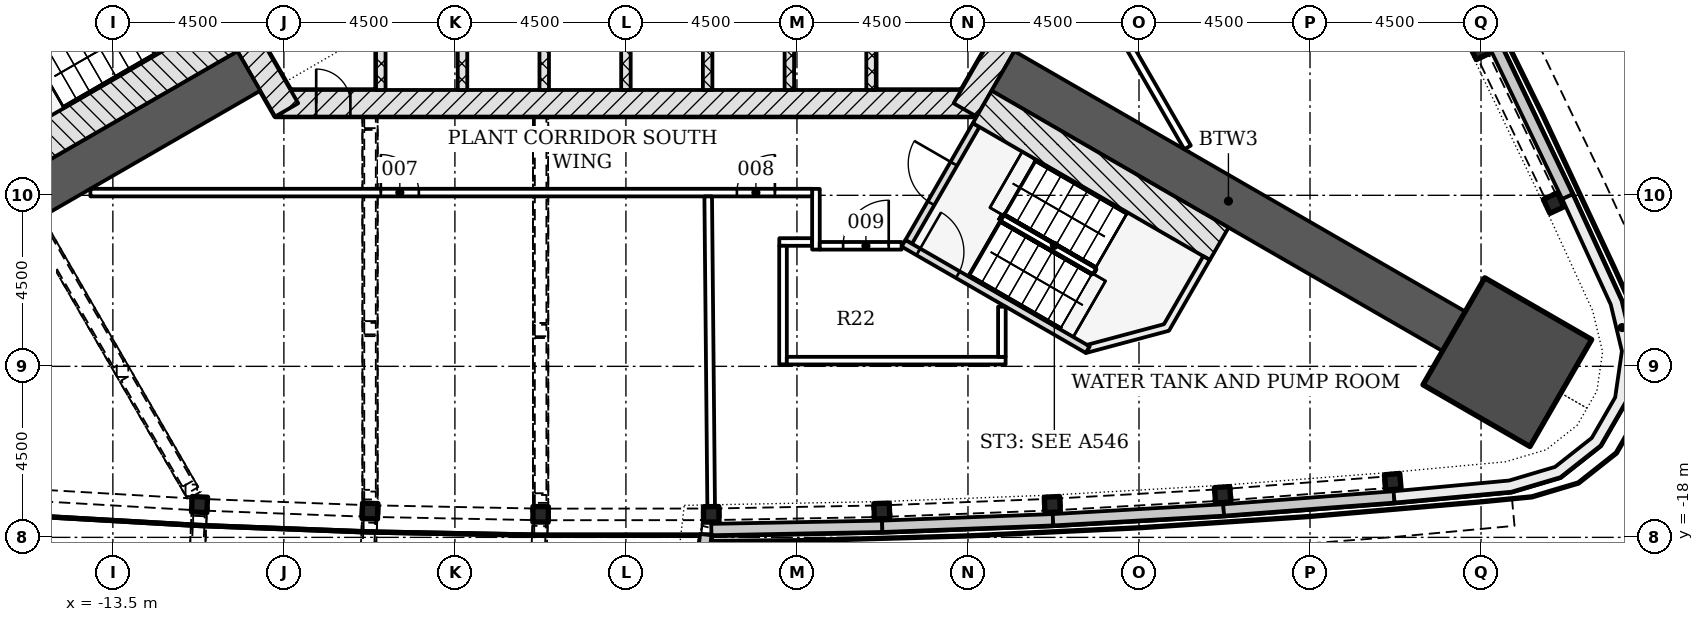
"""IFC4 building model, lengths in metres.
Left out: names, types, materials, properties, quantities, classifications, styles, units other than length and angle.
Written with IfcOpenShell. Run it as: python <this file> out.ifc"""

import sys

from ifc_helpers import new_model, si_unit, direction, frame, frame_2d, origin, origin_2d, place, context, subcontext, project, spatial, polyline, rectangle, i_section, outline, extrude, element, fill, save


model = new_model("IFC4")
c1 = context("Model", 3, precision=1e-05, world=origin(), true_north=direction((0.0, 1.0)))
c2 = subcontext(c1, "Body", "Model", "MODEL_VIEW")
j1 = project(units=[si_unit("LENGTHUNIT", "METRE"), si_unit("PLANEANGLEUNIT", "RADIAN")], contexts=[c1])
p1 = place(None, origin())
s1 = spatial("IfcSite", under=j1, at=p1, CompositionType="ELEMENT")
p2 = place(p1, origin())
s2 = spatial("IfcBuilding", under=s1, at=p2, CompositionType="ELEMENT")
p3 = place(p2, frame((0.0, 0.0, 52.8)))
s3 = spatial("IfcBuildingStorey", under=s2, at=p3, CompositionType="ELEMENT", Elevation=52.8)
p4 = place(p3, frame((-9.229, -6.578, -0.3), z_axis=(0.0, 0.0, 1.0), x_axis=(1.0, 0.0, 0.0)))
e1 = element("IfcWall", 1, at=p4, inside=s3, PredefinedType="SHEAR", context=c2, shape_type="SweptSolid", body=[
    extrude(rectangle(XDim=18.458, YDim=0.7, at=frame_2d((9.229, 0.0))), origin(), (0.0, 0.0, 1.0), 5.5),
])
p5 = place(p4, frame((1.079, 0.0, 0.3)))
e2 = element("IfcOpeningElement", 2, at=p5, cuts=e1, PredefinedType="OPENING", context=c2, shape_type="SweptSolid", body=[
    extrude(rectangle(XDim=0.9, YDim=2.1, at=frame_2d((0.45, 1.05))), frame((0.0, 0.36, 0.0), z_axis=(0.0, -1.0, 0.0), x_axis=(1.0, 0.0, 0.0)), (0.0, 0.0, 1.0), 0.72),
])
for number, where, z_axis, x_axis in (
    (3, (8.926, -6.753, -0.3), (0.0, 0.0, 1.0), (0.5, 0.866, 0.0)),
    (4, (-10.311, -4.353, -0.3), (0.0, 0.0, 1.0), (0.5, -0.866, 0.0)),
):
    element("IfcWall", number, at=place(p3, frame(where, z_axis=z_axis, x_axis=x_axis)), inside=s3, PredefinedType="SHEAR", context=c2, shape_type="SweptSolid", body=[
        extrude(rectangle(XDim=2.771, YDim=0.7, at=frame_2d((1.386, 0.0))), origin(), (0.0, 0.0, 1.0), 5.5),
    ])
for number, where, z_axis, x_axis in (
    (5, (-9.922, -5.728, -0.3), (0.0, 0.0, 1.0), (-0.866, -0.5, 0.0)),
    (6, (9.922, -5.728, -0.3), (0.0, 0.0, 1.0), (0.866, -0.5, 0.0)),
):
    element("IfcWall", number, at=place(p3, frame(where, z_axis=z_axis, x_axis=x_axis)), inside=s3, PredefinedType="SHEAR", context=c2, shape_type="SweptSolid", body=[
        extrude(rectangle(XDim=13.698, YDim=1.2, at=frame_2d((6.849, 0.0))), origin(), (0.0, 0.0, 1.0), 5.5),
    ])
p6 = place(p3, frame((23.192, -13.39, -0.3), z_axis=(0.0, 0.0, 1.0), x_axis=(0.866025403784, -0.5, 0.0)))
e7 = element("IfcColumn", 7, at=p6, inside=s3, PredefinedType="COLUMN", context=c2, shape_type="SweptSolid", body=[
    extrude(rectangle(XDim=3.25, YDim=3.25, at=origin_2d()), origin(), (0.0, 0.0, 1.0), 5.5),
])
for number, where, z_axis, x_axis in (
    (8, (-11.219, -17.137, -0.3), (0.0, 0.0, 1.0), (0.999, -0.048, 0.0)),
    (9, (-6.733, -17.308, -0.3), (0.0, 0.0, 1.0), (1.0, -0.029, 0.0)),
    (10, (-2.245, -17.394, -0.3), (0.0, 0.0, 1.0), (1.0, -0.01, 0.0)),
    (11, (2.245, -17.394, -0.3), (0.0, 0.0, 1.0), (1.0, 0.01, 0.0)),
    (12, (6.733, -17.308, -0.3), (0.0, 0.0, 1.0), (1.0, 0.029, 0.0)),
    (13, (11.219, -17.137, -0.3), (0.0, 0.0, 1.0), (0.999, 0.048, 0.0)),
    (14, (15.702, -16.88, -0.3), (0.0, 0.0, 1.0), (0.998, 0.067, 0.0)),
    (15, (20.178, -16.537, -0.3), (0.0, 0.0, 1.0), (0.996, 0.086, 0.0)),
    (16, (24.411, -9.206, -0.3), (0.0, 0.0, 1.0), (-0.424, 0.906, 0.0)),
    (17, (22.469, -5.158, -0.3), (0.0, 0.0, 1.0), (-0.441, 0.897, 0.0)),
):
    element("IfcColumn", number, at=place(p3, frame(where, z_axis=z_axis, x_axis=x_axis)), inside=s3, PredefinedType="COLUMN", context=c2, shape_type="SweptSolid", body=[
        extrude(i_section(OverallWidth=0.404, OverallDepth=0.406, WebThickness=0.027, FlangeThickness=0.044, FilletRadius=0.015, at=origin_2d()), origin(), (0.0, 0.0, 1.0), 5.5),
    ])
p7 = place(p3, origin())
e18 = element("IfcWall", 18, at=p7, inside=s3, PredefinedType="NOTDEFINED", context=c2, shape_type="SweptSolid", body=[
    extrude(outline(polyline([(1.928, -20.798), (2.25, -17.944), (1.952, -17.91), (1.63, -20.764), (1.928, -20.798)])), origin(), (0.0, 0.0, 1.0), 1.2),
])
p8 = place(p3, origin())
e19 = element("IfcWall", 19, at=p8, inside=s3, PredefinedType="NOTDEFINED", context=c2, shape_type="SweptSolid", body=[
    extrude(outline(polyline([(2.25, -17.944), (6.749, -17.858), (6.743, -17.558), (2.244, -17.644), (2.25, -17.944)])), origin(), (0.0, 0.0, 1.0), 1.2),
])
p9 = place(p3, origin())
e20 = element("IfcWall", 20, at=p9, inside=s3, PredefinedType="NOTDEFINED", context=c2, shape_type="SweptSolid", body=[
    extrude(outline(polyline([(6.749, -17.858), (11.246, -17.686), (11.234, -17.386), (6.738, -17.558), (6.749, -17.858)])), origin(), (0.0, 0.0, 1.0), 1.2),
])
p10 = place(p3, origin())
e21 = element("IfcWall", 21, at=p10, inside=s3, PredefinedType="NOTDEFINED", context=c2, shape_type="SweptSolid", body=[
    extrude(outline(polyline([(11.246, -17.686), (15.738, -17.429), (15.721, -17.129), (11.229, -17.387), (11.246, -17.686)])), origin(), (0.0, 0.0, 1.0), 1.2),
])
p11 = place(p3, origin())
e22 = element("IfcWall", 22, at=p11, inside=s3, PredefinedType="NOTDEFINED", context=c2, shape_type="SweptSolid", body=[
    extrude(outline(polyline([(15.738, -17.429), (20.225, -17.085), (20.202, -16.786), (15.715, -17.13), (15.738, -17.429)])), origin(), (0.0, 0.0, 1.0), 1.2),
])
p12 = place(p3, origin())
e23 = element("IfcWall", 23, at=p12, inside=s3, PredefinedType="NOTDEFINED", context=c2, shape_type="SweptSolid", body=[
    extrude(outline(polyline([(24.909, -8.973), (22.963, -4.916), (22.692, -5.045), (24.638, -9.103), (24.909, -8.973)])), origin(), (0.0, 0.0, 1.0), 1.2),
])
p13 = place(p3, origin())
e24 = element("IfcWall", 24, at=p13, inside=s3, PredefinedType="NOTDEFINED", context=c2, shape_type="SweptSolid", body=[
    extrude(outline(polyline([(20.225, -17.085), (23.297, -16.8), (24.588, -16.417), (25.645, -15.583), (26.318, -14.417), (26.511, -13.085), (26.198, -11.776), (24.909, -8.973), (24.636, -9.098), (25.913, -11.875), (26.206, -13.099), (26.029, -14.317), (25.414, -15.384), (24.447, -16.146), (23.24, -16.504), (20.197, -16.787), (20.225, -17.085)])), origin(), (0.0, 0.0, 1.0), 5.2),
])
for number, where, z_axis, x_axis in (
    (25, (-6.45, -6.228, -0.3), (0.0, 0.0, 1.0), (0.0, 1.0, 0.0)),
    (26, (-4.3, -6.228, -0.3), (0.0, 0.0, 1.0), (0.0, 1.0, 0.0)),
    (27, (-2.15, -6.228, -0.3), (0.0, 0.0, 1.0), (0.0, 1.0, 0.0)),
    (28, (0.0, -6.228, -0.3), (0.0, 0.0, 1.0), (0.0, 1.0, 0.0)),
    (29, (2.15, -6.228, -0.3), (0.0, 0.0, 1.0), (0.0, 1.0, 0.0)),
    (30, (4.3, -6.228, -0.3), (0.0, 0.0, 1.0), (0.0, 1.0, 0.0)),
    (31, (6.45, -6.228, -0.3), (0.0, 0.0, 1.0), (0.0, 1.0, 0.0)),
):
    element("IfcWall", number, at=place(p3, frame(where, z_axis=z_axis, x_axis=x_axis)), inside=s3, PredefinedType="PARTITIONING", context=c2, shape_type="SweptSolid", body=[
        extrude(rectangle(XDim=2.5, YDim=0.25, at=frame_2d((1.25, 0.0))), origin(), (0.0, 0.0, 1.0), 5.5),
    ])
p14 = place(p3, frame((-10.468, -4.782, -0.3), z_axis=(0.0, 0.0, 1.0), x_axis=(-0.866018442252, -0.500012057535, 0.0)))
e32 = element("IfcWall", 32, at=p14, inside=s3, PredefinedType="SHEAR", context=c2, shape_type="SweptSolid", body=[
    extrude(rectangle(XDim=7.2, YDim=0.986, at=frame_2d((3.6, 0.0))), origin(), (0.0, 0.0, 1.0), 5.5),
])
p15 = place(p3, frame((7.44, -10.226, -0.3), z_axis=(0.0, 0.0, 1.0), x_axis=(0.500022077904, 0.866012656725, 0.0)))
e33 = element("IfcWall", 33, at=p15, inside=s3, PredefinedType="SHEAR", context=c2, shape_type="SweptSolid", body=[
    extrude(rectangle(XDim=3.55, YDim=0.2, at=frame_2d((1.775, 0.0))), origin(), (0.0, 0.0, 1.0), 5.5),
])
p16 = place(p15, frame((1.175, 0.0, 0.3)))
e34 = element("IfcOpeningElement", 34, at=p16, cuts=e33, PredefinedType="OPENING", context=c2, shape_type="SweptSolid", body=[
    extrude(rectangle(XDim=1.2, YDim=2.1, at=frame_2d((0.6, 1.05))), frame((0.0, 0.11, 0.0), z_axis=(0.0, -1.0, 0.0), x_axis=(1.0, 0.0, 0.0)), (0.0, 0.0, 1.0), 0.22),
])
p17 = place(p3, frame((7.304, -10.262, -0.3), z_axis=(0.0, 0.0, 1.0), x_axis=(0.866026594901, -0.49999793692, 0.0)))
e35 = element("IfcWall", 35, at=p17, inside=s3, PredefinedType="SHEAR", context=c2, shape_type="SweptSolid", body=[
    extrude(rectangle(XDim=5.6, YDim=0.2, at=frame_2d((2.8, 0.0))), origin(), (0.0, 0.0, 1.0), 5.5),
])
p18 = place(p17, frame((0.45, 0.0, 0.3)))
e36 = element("IfcOpeningElement", 36, at=p18, cuts=e35, PredefinedType="OPENING", context=c2, shape_type="SweptSolid", body=[
    extrude(rectangle(XDim=1.2, YDim=2.1, at=frame_2d((0.6, 1.05))), frame((0.0, 0.11, 0.0), z_axis=(0.0, -1.0, 0.0), x_axis=(1.0, 0.0, 0.0)), (0.0, 0.0, 1.0), 0.22),
])
p19 = place(p3, frame((9.375, -6.675, -0.3), z_axis=(0.0, 0.0, 1.0), x_axis=(0.866026919366, -0.499997374926, 0.0)))
e37 = element("IfcWall", 37, at=p19, inside=s3, PredefinedType="SHEAR", context=c2, shape_type="SweptSolid", body=[
    extrude(rectangle(XDim=7.2, YDim=0.986, at=frame_2d((3.6, 0.0))), origin(), (0.0, 0.0, 1.0), 5.5),
])
p20 = place(p3, frame((0.0, 0.0, -0.3)))
e38 = element("IfcWall", 38, at=p20, inside=s3, PredefinedType="SHEAR", context=c2, shape_type="SweptSolid", body=[
    extrude(outline(polyline([(12.104, -13.149), (14.289, -12.563), (15.364, -10.701), (15.191, -10.601), (14.157, -12.392), (12.132, -12.934), (12.204, -12.976), (12.204, -12.976), (12.204, -12.976), (12.204, -12.976), (12.204, -12.976), (12.204, -12.976), (12.204, -12.976), (12.204, -12.976), (12.204, -12.976), (12.204, -12.976), (12.204, -12.976), (12.204, -12.976), (12.204, -12.976), (12.204, -12.976), (12.204, -12.976), (12.204, -12.976), (12.204, -12.976), (12.104, -13.149)])), origin(), (0.0, 0.0, 1.0), 5.5),
])
p21 = place(p3, frame((4.036, -10.228, 0.0), z_axis=(0.0, 0.0, 1.0), x_axis=(1.0, 0.0, 0.0)))
e39 = element("IfcWall", 39, at=p21, inside=s3, PredefinedType="PARTITIONING", context=c2, shape_type="SweptSolid", body=[
    extrude(rectangle(XDim=0.864, YDim=0.2, at=frame_2d((0.432, 0.0))), origin(), (0.0, 0.0, 1.0), 5.2),
])
p22 = place(p3, frame((5.0, -10.428, 0.0), z_axis=(0.0, 0.0, 1.0), x_axis=(0.0, 1.0, 0.0)))
e40 = element("IfcWall", 40, at=p22, inside=s3, PredefinedType="PARTITIONING", context=c2, shape_type="SweptSolid", body=[
    extrude(rectangle(XDim=1.598, YDim=0.2, at=frame_2d((0.799, 0.0))), origin(), (0.0, 0.0, 1.0), 5.2),
])
p23 = place(p3, frame((5.1, -10.328, 0.0), z_axis=(0.0, 0.0, 1.0), x_axis=(1.0, 0.0, 0.0)))
e41 = element("IfcWall", 41, at=p23, inside=s3, PredefinedType="PARTITIONING", context=c2, shape_type="SweptSolid", body=[
    extrude(rectangle(XDim=2.154, YDim=0.2, at=frame_2d((1.077, 0.0))), origin(), (0.0, 0.0, 1.0), 4.578),
])
p24 = place(p23, frame((0.615, 0.0, 0.0)))
e42 = element("IfcOpeningElement", 42, at=p24, cuts=e41, PredefinedType="OPENING", context=c2, shape_type="SweptSolid", body=[
    extrude(rectangle(XDim=1.2, YDim=2.1, at=frame_2d((0.6, 1.05))), frame((0.0, 0.11, 0.0), z_axis=(0.0, -1.0, 0.0), x_axis=(1.0, 0.0, 0.0)), (0.0, 0.0, 1.0), 0.22),
])
p25 = place(p3, frame((-14.091, -8.928, 0.0), z_axis=(0.0, 0.0, 1.0), x_axis=(1.0, 0.0, 0.0)))
e43 = element("IfcWall", 43, at=p25, inside=s3, PredefinedType="PARTITIONING", context=c2, shape_type="SweptSolid", body=[
    extrude(rectangle(XDim=18.991, YDim=0.2, at=frame_2d((9.495, 0.0))), origin(), (0.0, 0.0, 1.0), 4.578),
])
p26 = place(p25, frame((7.642, 0.0, 0.0)))
e44 = element("IfcOpeningElement", 44, at=p26, cuts=e43, PredefinedType="OPENING", context=c2, shape_type="SweptSolid", body=[
    extrude(rectangle(XDim=1.0, YDim=2.1, at=frame_2d((0.5, 1.05))), frame((0.0, 0.11, 0.0), z_axis=(0.0, -1.0, 0.0), x_axis=(1.0, 0.0, 0.0)), (0.0, 0.0, 1.0), 0.22),
])
p27 = place(p25, frame((17.011, 0.0, 0.0)))
e45 = element("IfcOpeningElement", 45, at=p27, cuts=e43, PredefinedType="OPENING", context=c2, shape_type="SweptSolid", body=[
    extrude(rectangle(XDim=1.0, YDim=2.1, at=frame_2d((0.5, 1.05))), frame((0.0, 0.11, 0.0), z_axis=(0.0, -1.0, 0.0), x_axis=(1.0, 0.0, 0.0)), (0.0, 0.0, 1.0), 0.22),
])
p28 = place(p3, frame((2.165, -9.029, 0.0), z_axis=(0.0, 0.0, 1.0), x_axis=(0.009569508604, -0.999954211204, 0.0)))
e46 = element("IfcWall", 46, at=p28, inside=s3, PredefinedType="PARTITIONING", context=c2, shape_type="SweptSolid", body=[
    extrude(rectangle(XDim=8.215, YDim=0.2, at=frame_2d((4.107, 0.0))), origin(), (0.0, 0.0, 1.0), 4.578),
])
p29 = place(p3, frame((4.134, -10.328, 0.0), z_axis=(0.0, 0.0, 1.0), x_axis=(0.0, -1.0, 0.0)))
e47 = element("IfcWall", 47, at=p29, inside=s3, PredefinedType="PARTITIONING", context=c2, shape_type="SweptSolid", body=[
    extrude(rectangle(XDim=3.12, YDim=0.2, at=frame_2d((1.56, 0.0))), origin(), (0.0, 0.0, 1.0), 5.2),
])
p30 = place(p3, frame((4.234, -13.35, 0.0), z_axis=(0.0, 0.0, 1.0), x_axis=(1.0, 0.0, 0.0)))
e48 = element("IfcWall", 48, at=p30, inside=s3, PredefinedType="PARTITIONING", context=c2, shape_type="SweptSolid", body=[
    extrude(rectangle(XDim=5.757, YDim=0.2, at=frame_2d((2.878, 0.0))), origin(), (0.0, 0.0, 1.0), 4.578),
])
p31 = place(p3, frame((9.893, -13.25, 0.0), z_axis=(0.0, 0.0, 1.0), x_axis=(0.0, 1.0, 0.0)))
e49 = element("IfcWall", 49, at=p31, inside=s3, PredefinedType="PARTITIONING", context=c2, shape_type="SweptSolid", body=[
    extrude(rectangle(XDim=1.32, YDim=0.2, at=frame_2d((0.66, 0.0))), origin(), (0.0, 0.0, 1.0), 5.2),
])
p32 = place(p3, frame((5.282, 8.708, 0.0), z_axis=(0.0, 0.0, 1.0), x_axis=(0.500007704848, -0.866020955343, 0.0)))
e50 = element("IfcWall", 50, at=p32, inside=s3, PredefinedType="PARTITIONING", context=c2, shape_type="SweptSolid", body=[
    extrude(rectangle(XDim=18.991, YDim=0.2, at=frame_2d((9.496, 0.0))), origin(), (0.0, 0.0, 1.0), 4.578),
])
p33 = place(p32, frame((14.779, 0.0, 0.0)))
e51 = element("IfcOpeningElement", 51, at=p33, cuts=e50, PredefinedType="OPENING", context=c2, shape_type="SweptSolid", body=[
    extrude(rectangle(XDim=1.0, YDim=2.1, at=frame_2d((0.5, 1.05))), frame((0.0, 0.11, 0.0), z_axis=(0.0, -1.0, 0.0), x_axis=(1.0, 0.0, 0.0)), (0.0, 0.0, 1.0), 0.22),
])
p34 = place(p32, frame((8.83, 0.0, 0.0)))
e52 = element("IfcOpeningElement", 52, at=p34, cuts=e50, PredefinedType="OPENING", context=c2, shape_type="SweptSolid", body=[
    extrude(rectangle(XDim=1.0, YDim=2.1, at=frame_2d((0.5, 1.05))), frame((0.0, 0.11, 0.0), z_axis=(0.0, -1.0, 0.0), x_axis=(1.0, 0.0, 0.0)), (0.0, 0.0, 1.0), 0.22),
])
p35 = place(p32, frame((2.435, 0.0, 0.0)))
e53 = element("IfcOpeningElement", 53, at=p35, cuts=e50, PredefinedType="OPENING", context=c2, shape_type="SweptSolid", body=[
    extrude(rectangle(XDim=1.0, YDim=2.1, at=frame_2d((0.5, 1.05))), frame((0.0, 0.11, 0.0), z_axis=(0.0, -1.0, 0.0), x_axis=(1.0, 0.0, 0.0)), (0.0, 0.0, 1.0), 0.22),
])
p36 = place(p5, origin())
e54 = element("IfcDoor", 54, at=p36, inside=s3, OperationType="SINGLE_SWING_LEFT", PredefinedType="DOOR", context=c2, shape_type="SweptSolid", body=[
    extrude(rectangle(XDim=0.9, YDim=2.1, at=frame_2d((0.45, 1.05))), frame((0.0, 0.075, 0.0), z_axis=(0.0, -1.0, 0.0), x_axis=(1.0, 0.0, 0.0)), (0.0, 0.0, 1.0), 0.15),
])
fill(e2, e54)
p37 = place(p16, origin())
e55 = element("IfcDoor", 55, at=p37, inside=s3, OperationType="SINGLE_SWING_RIGHT", PredefinedType="DOOR", context=c2, shape_type="SweptSolid", body=[
    extrude(rectangle(XDim=1.2, YDim=2.1, at=frame_2d((0.6, 1.05))), frame((0.0, 0.025, 0.0), z_axis=(0.0, -1.0, 0.0), x_axis=(1.0, 0.0, 0.0)), (0.0, 0.0, 1.0), 0.05),
])
fill(e34, e55)
p38 = place(p18, origin())
e56 = element("IfcDoor", 56, at=p38, inside=s3, OperationType="SINGLE_SWING_LEFT", PredefinedType="DOOR", context=c2, shape_type="SweptSolid", body=[
    extrude(rectangle(XDim=1.2, YDim=2.1, at=frame_2d((0.6, 1.05))), frame((0.0, 0.025, 0.0), z_axis=(0.0, -1.0, 0.0), x_axis=(1.0, 0.0, 0.0)), (0.0, 0.0, 1.0), 0.05),
])
fill(e36, e56)
p39 = place(p26, origin())
e57 = element("IfcDoor", 57, at=p39, inside=s3, OperationType="SINGLE_SWING_LEFT", PredefinedType="DOOR", context=c2, shape_type="SweptSolid", body=[
    extrude(rectangle(XDim=1.0, YDim=2.1, at=frame_2d((0.5, 1.05))), frame((0.0, 0.025, 0.0), z_axis=(0.0, -1.0, 0.0), x_axis=(1.0, 0.0, 0.0)), (0.0, 0.0, 1.0), 0.05),
])
fill(e44, e57)
p40 = place(p27, origin())
e58 = element("IfcDoor", 58, at=p40, inside=s3, OperationType="SINGLE_SWING_RIGHT", PredefinedType="DOOR", context=c2, shape_type="SweptSolid", body=[
    extrude(rectangle(XDim=1.0, YDim=2.1, at=frame_2d((0.5, 1.05))), frame((0.0, 0.025, 0.0), z_axis=(0.0, -1.0, 0.0), x_axis=(1.0, 0.0, 0.0)), (0.0, 0.0, 1.0), 0.05),
])
fill(e45, e58)
p41 = place(p24, origin())
e59 = element("IfcDoor", 59, at=p41, inside=s3, OperationType="SINGLE_SWING_RIGHT", PredefinedType="DOOR", context=c2, shape_type="SweptSolid", body=[
    extrude(rectangle(XDim=1.2, YDim=2.1, at=frame_2d((0.6, 1.05))), frame((0.0, 0.025, 0.0), z_axis=(0.0, -1.0, 0.0), x_axis=(1.0, 0.0, 0.0)), (0.0, 0.0, 1.0), 0.05),
])
fill(e42, e59)
save(model, sys.argv[1])
